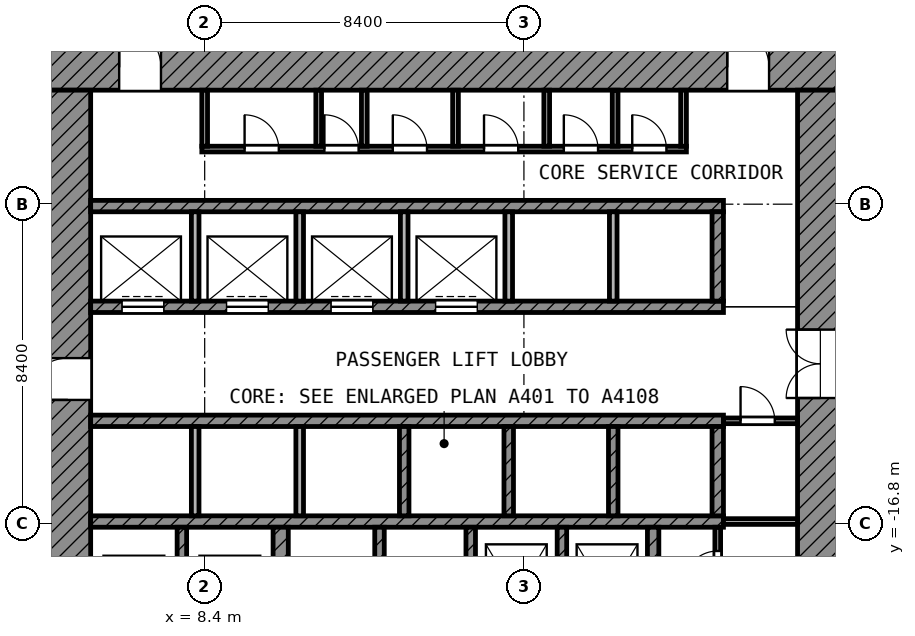
"""IFC4 building model, lengths in metres.
Left out: names, types, materials, properties, quantities, classifications, styles, units other than length and angle.
Written with IfcOpenShell. Run it as: python <this file> out.ifc"""

import sys

from ifc_helpers import new_model, si_unit, direction, frame, frame_2d, origin, place, context, subcontext, project, spatial, rectangle, extrude, element, fill, save


model = new_model("IFC4")
c1 = context("Model", 3, precision=1e-05, world=origin(), true_north=direction((0.0, 1.0)))
c2 = subcontext(c1, "Body", "Model", "MODEL_VIEW")
j1 = project(units=[si_unit("LENGTHUNIT", "METRE"), si_unit("PLANEANGLEUNIT", "RADIAN")], contexts=[c1])
p1 = place(None, origin())
s1 = spatial("IfcSite", under=j1, at=p1, CompositionType="ELEMENT")
p2 = place(p1, origin())
s2 = spatial("IfcBuilding", under=s1, at=p2, CompositionType="ELEMENT")
p3 = place(p2, frame((0.0, 0.0, 23.8)))
s3 = spatial("IfcBuildingStorey", under=s2, at=p3, CompositionType="ELEMENT", Elevation=23.8)
p4 = place(p3, frame((4.2, -4.8, 0.0), z_axis=(0.0, 0.0, 1.0), x_axis=(1.0, 0.0, 0.0)))
e1 = element("IfcWall", 1, at=p4, inside=s3, PredefinedType="SHEAR", context=c2, shape_type="SweptSolid", body=[
    extrude(rectangle(XDim=21.0, YDim=1.2, at=frame_2d((10.5, 0.0))), origin(), (0.0, 0.0, 1.0), 4.85),
])
p5 = place(p4, frame((1.95, 0.0, 0.0)))
e2 = element("IfcOpeningElement", 2, at=p5, cuts=e1, PredefinedType="OPENING", context=c2, shape_type="SweptSolid", body=[
    extrude(rectangle(XDim=1.1, YDim=2.1, at=frame_2d((0.55, 1.05))), frame((0.0, 0.61, 0.0), z_axis=(0.0, -1.0, 0.0), x_axis=(1.0, 0.0, 0.0)), (0.0, 0.0, 1.0), 1.22),
])
p6 = place(p4, frame((17.95, 0.0, 0.0)))
e3 = element("IfcOpeningElement", 3, at=p6, cuts=e1, PredefinedType="OPENING", context=c2, shape_type="SweptSolid", body=[
    extrude(rectangle(XDim=1.1, YDim=2.1, at=frame_2d((0.55, 1.05))), frame((0.0, 0.61, 0.0), z_axis=(0.0, -1.0, 0.0), x_axis=(1.0, 0.0, 0.0)), (0.0, 0.0, 1.0), 1.22),
])
p7 = place(p3, frame((4.8, -25.2, 0.0), z_axis=(0.0, 0.0, 1.0), x_axis=(0.0, 1.0, 0.0)))
e4 = element("IfcWall", 4, at=p7, inside=s3, PredefinedType="SHEAR", context=c2, shape_type="SweptSolid", body=[
    extrude(rectangle(XDim=19.8, YDim=1.2, at=frame_2d((9.9, 0.0))), origin(), (0.0, 0.0, 1.0), 4.85),
])
p8 = place(p7, frame((11.65, 0.0, 0.0)))
e5 = element("IfcOpeningElement", 5, at=p8, cuts=e4, PredefinedType="OPENING", context=c2, shape_type="SweptSolid", body=[
    extrude(rectangle(XDim=1.1, YDim=2.1, at=frame_2d((0.55, 1.05))), frame((0.0, 0.61, 0.0), z_axis=(0.0, -1.0, 0.0), x_axis=(1.0, 0.0, 0.0)), (0.0, 0.0, 1.0), 1.22),
])
p9 = place(p7, frame((2.35, 0.0, 0.0)))
e6 = element("IfcOpeningElement", 6, at=p9, cuts=e4, PredefinedType="OPENING", context=c2, shape_type="SweptSolid", body=[
    extrude(rectangle(XDim=1.1, YDim=2.1, at=frame_2d((0.55, 1.05))), frame((0.0, 0.61, 0.0), z_axis=(0.0, -1.0, 0.0), x_axis=(1.0, 0.0, 0.0)), (0.0, 0.0, 1.0), 1.22),
])
p10 = place(p3, frame((24.6, -24.0, 0.0), z_axis=(0.0, 0.0, 1.0), x_axis=(0.0, 1.0, 0.0)))
e7 = element("IfcWall", 7, at=p10, inside=s3, PredefinedType="SHEAR", context=c2, shape_type="SweptSolid", body=[
    extrude(rectangle(XDim=18.6, YDim=1.2, at=frame_2d((9.3, 0.0))), origin(), (0.0, 0.0, 1.0), 4.85),
])
p11 = place(p10, frame((10.5, 0.0, 0.0)))
e8 = element("IfcOpeningElement", 8, at=p11, cuts=e7, PredefinedType="OPENING", context=c2, shape_type="SweptSolid", body=[
    extrude(rectangle(XDim=1.8, YDim=2.1, at=frame_2d((0.9, 1.05))), frame((0.0, 0.61, 0.0), z_axis=(0.0, -1.0, 0.0), x_axis=(1.0, 0.0, 0.0)), (0.0, 0.0, 1.0), 1.22),
])
p12 = place(p3, frame((5.4, -8.45, 0.0), z_axis=(0.0, 0.0, 1.0), x_axis=(1.0, 0.0, 0.0)))
e9 = element("IfcWall", 9, at=p12, inside=s3, PredefinedType="SHEAR", context=c2, shape_type="SweptSolid", body=[
    extrude(rectangle(XDim=16.65, YDim=0.3, at=frame_2d((8.325, 0.0))), origin(), (0.0, 0.0, 1.0), 4.85),
])
p13 = place(p3, frame((5.4, -11.1, 0.0), z_axis=(0.0, 0.0, 1.0), x_axis=(1.0, 0.0, 0.0)))
e10 = element("IfcWall", 10, at=p13, inside=s3, PredefinedType="SHEAR", context=c2, shape_type="SweptSolid", body=[
    extrude(rectangle(XDim=16.65, YDim=0.3, at=frame_2d((8.325, 0.0))), origin(), (0.0, 0.0, 1.0), 4.85),
])
p14 = place(p13, frame((0.825, 0.0, 0.0)))
e11 = element("IfcOpeningElement", 11, at=p14, cuts=e10, PredefinedType="OPENING", context=c2, shape_type="SweptSolid", body=[
    extrude(rectangle(XDim=1.1, YDim=2.1, at=frame_2d((0.55, 1.05))), frame((0.0, 0.16, 0.0), z_axis=(0.0, -1.0, 0.0), x_axis=(1.0, 0.0, 0.0)), (0.0, 0.0, 1.0), 0.32),
])
p15 = place(p13, frame((3.575, 0.0, 0.0)))
e12 = element("IfcOpeningElement", 12, at=p15, cuts=e10, PredefinedType="OPENING", context=c2, shape_type="SweptSolid", body=[
    extrude(rectangle(XDim=1.1, YDim=2.1, at=frame_2d((0.55, 1.05))), frame((0.0, 0.16, 0.0), z_axis=(0.0, -1.0, 0.0), x_axis=(1.0, 0.0, 0.0)), (0.0, 0.0, 1.0), 0.32),
])
p16 = place(p13, frame((6.325, 0.0, 0.0)))
e13 = element("IfcOpeningElement", 13, at=p16, cuts=e10, PredefinedType="OPENING", context=c2, shape_type="SweptSolid", body=[
    extrude(rectangle(XDim=1.1, YDim=2.1, at=frame_2d((0.55, 1.05))), frame((0.0, 0.16, 0.0), z_axis=(0.0, -1.0, 0.0), x_axis=(1.0, 0.0, 0.0)), (0.0, 0.0, 1.0), 0.32),
])
p17 = place(p13, frame((9.075, 0.0, 0.0)))
e14 = element("IfcOpeningElement", 14, at=p17, cuts=e10, PredefinedType="OPENING", context=c2, shape_type="SweptSolid", body=[
    extrude(rectangle(XDim=1.1, YDim=2.1, at=frame_2d((0.55, 1.05))), frame((0.0, 0.16, 0.0), z_axis=(0.0, -1.0, 0.0), x_axis=(1.0, 0.0, 0.0)), (0.0, 0.0, 1.0), 0.32),
])
for number, where, z_axis, x_axis in (
    (15, (5.4, -14.1, 0.0), (0.0, 0.0, 1.0), (1.0, 0.0, 0.0)),
    (16, (5.4, -16.75, 0.0), (0.0, 0.0, 1.0), (1.0, 0.0, 0.0)),
):
    element("IfcWall", number, at=place(p3, frame(where, z_axis=z_axis, x_axis=x_axis)), inside=s3, PredefinedType="SHEAR", context=c2, shape_type="SweptSolid", body=[
        extrude(rectangle(XDim=16.65, YDim=0.3, at=frame_2d((8.325, 0.0))), origin(), (0.0, 0.0, 1.0), 4.85),
    ])
p18 = place(p3, frame((10.4, -20.05, 0.0), z_axis=(0.0, 0.0, 1.0), x_axis=(0.0, 1.0, 0.0)))
e17 = element("IfcWall", 17, at=p18, inside=s3, PredefinedType="SHEAR", context=c2, shape_type="SweptSolid", body=[
    extrude(rectangle(XDim=3.15, YDim=0.4, at=frame_2d((1.575, 0.0))), origin(), (0.0, 0.0, 1.0), 4.85),
])
p19 = place(p3, frame((20.2, -20.35, 0.0), z_axis=(0.0, 0.0, 1.0), x_axis=(0.0, 1.0, 0.0)))
e18 = element("IfcWall", 18, at=p19, inside=s3, PredefinedType="SHEAR", context=c2, shape_type="SweptSolid", body=[
    extrude(rectangle(XDim=3.45, YDim=0.3, at=frame_2d((1.725, 0.0))), origin(), (0.0, 0.0, 1.0), 4.85),
])
p20 = place(p3, frame((21.9, -10.95, 0.0), z_axis=(0.0, 0.0, 1.0), x_axis=(0.0, 1.0, 0.0)))
e19 = element("IfcWall", 19, at=p20, inside=s3, PredefinedType="SHEAR", context=c2, shape_type="SweptSolid", body=[
    extrude(rectangle(XDim=2.35, YDim=0.3, at=frame_2d((1.175, 0.0))), origin(), (0.0, 0.0, 1.0), 4.85),
])
p21 = place(p3, frame((21.9, -16.6, 0.0), z_axis=(0.0, 0.0, 1.0), x_axis=(0.0, 1.0, 0.0)))
e20 = element("IfcWall", 20, at=p21, inside=s3, PredefinedType="SHEAR", context=c2, shape_type="SweptSolid", body=[
    extrude(rectangle(XDim=2.35, YDim=0.3, at=frame_2d((1.175, 0.0))), origin(), (0.0, 0.0, 1.0), 4.85),
])
for number, where, z_axis, x_axis in (
    (21, (7.8, -20.05, 0.0), (0.0, 0.0, 1.0), (0.0, 1.0, 0.0)),
    (22, (13.0, -20.05, 0.0), (0.0, 0.0, 1.0), (0.0, 1.0, 0.0)),
    (23, (15.4, -20.05, 0.0), (0.0, 0.0, 1.0), (0.0, 1.0, 0.0)),
    (24, (17.8, -20.05, 0.0), (0.0, 0.0, 1.0), (0.0, 1.0, 0.0)),
):
    element("IfcWall", number, at=place(p3, frame(where, z_axis=z_axis, x_axis=x_axis)), inside=s3, PredefinedType="SHEAR", context=c2, shape_type="SweptSolid", body=[
        extrude(rectangle(XDim=3.15, YDim=0.25, at=frame_2d((1.575, 0.0))), origin(), (0.0, 0.0, 1.0), 4.85),
    ])
for number, where, z_axis, x_axis in (
    (25, (8.15, -10.95, 0.0), (0.0, 0.0, 1.0), (0.0, 1.0, 0.0)),
    (26, (10.9, -10.95, 0.0), (0.0, 0.0, 1.0), (0.0, 1.0, 0.0)),
    (27, (13.65, -10.95, 0.0), (0.0, 0.0, 1.0), (0.0, 1.0, 0.0)),
    (28, (16.4, -10.95, 0.0), (0.0, 0.0, 1.0), (0.0, 1.0, 0.0)),
    (29, (19.15, -10.95, 0.0), (0.0, 0.0, 1.0), (0.0, 1.0, 0.0)),
):
    element("IfcWall", number, at=place(p3, frame(where, z_axis=z_axis, x_axis=x_axis)), inside=s3, PredefinedType="PARTITIONING", context=c2, shape_type="SweptSolid", body=[
        extrude(rectangle(XDim=2.35, YDim=0.2, at=frame_2d((1.175, 0.0))), origin(), (0.0, 0.0, 1.0), 4.85),
    ])
for number, where, z_axis, x_axis in (
    (30, (8.15, -16.6, 0.0), (0.0, 0.0, 1.0), (0.0, 1.0, 0.0)),
    (31, (10.9, -16.6, 0.0), (0.0, 0.0, 1.0), (0.0, 1.0, 0.0)),
):
    element("IfcWall", number, at=place(p3, frame(where, z_axis=z_axis, x_axis=x_axis)), inside=s3, PredefinedType="PARTITIONING", context=c2, shape_type="SweptSolid", body=[
        extrude(rectangle(XDim=2.35, YDim=0.2, at=frame_2d((1.175, 0.0))), origin(), (0.0, 0.0, 1.0), 4.85),
    ])
for number, where, z_axis, x_axis in (
    (32, (13.65, -16.6, 0.0), (0.0, 0.0, 1.0), (0.0, 1.0, 0.0)),
    (33, (16.4, -16.6, 0.0), (0.0, 0.0, 1.0), (0.0, 1.0, 0.0)),
    (34, (19.15, -16.6, 0.0), (0.0, 0.0, 1.0), (0.0, 1.0, 0.0)),
):
    element("IfcWall", number, at=place(p3, frame(where, z_axis=z_axis, x_axis=x_axis)), inside=s3, PredefinedType="SHEAR", context=c2, shape_type="SweptSolid", body=[
        extrude(rectangle(XDim=2.35, YDim=0.25, at=frame_2d((1.175, 0.0))), origin(), (0.0, 0.0, 1.0), 4.85),
    ])
p22 = place(p3, frame((21.9, -19.05, 0.0), z_axis=(0.0, 0.0, 1.0), x_axis=(0.0, 1.0, 0.0)))
e35 = element("IfcWall", 35, at=p22, inside=s3, PredefinedType="PARTITIONING", context=c2, shape_type="SweptSolid", body=[
    extrude(rectangle(XDim=2.15, YDim=0.15, at=frame_2d((1.075, 0.0))), origin(), (0.0, 0.0, 1.0), 4.85),
])
p23 = place(p22, frame((0.625, 0.0, 0.0)))
e36 = element("IfcOpeningElement", 36, at=p23, cuts=e35, PredefinedType="OPENING", context=c2, shape_type="SweptSolid", body=[
    extrude(rectangle(XDim=0.9, YDim=2.1, at=frame_2d((0.45, 1.05))), frame((0.0, 0.085, 0.0), z_axis=(0.0, -1.0, 0.0), x_axis=(1.0, 0.0, 0.0)), (0.0, 0.0, 1.0), 0.17),
])
p24 = place(p3, frame((22.05, -16.75, 0.0), z_axis=(0.0, 0.0, 1.0), x_axis=(1.0, 0.0, 0.0)))
e37 = element("IfcWall", 37, at=p24, inside=s3, PredefinedType="PARTITIONING", context=c2, shape_type="SweptSolid", body=[
    extrude(rectangle(XDim=1.95, YDim=0.15, at=frame_2d((0.975, 0.0))), origin(), (0.0, 0.0, 1.0), 4.85),
])
p25 = place(p3, frame((22.05, -14.1, 0.0), z_axis=(0.0, 0.0, 1.0), x_axis=(1.0, 0.0, 0.0)))
e38 = element("IfcWall", 38, at=p25, inside=s3, PredefinedType="PARTITIONING", context=c2, shape_type="SweptSolid", body=[
    extrude(rectangle(XDim=1.95, YDim=0.15, at=frame_2d((0.975, 0.0))), origin(), (0.0, 0.0, 1.0), 4.85),
])
p26 = place(p25, frame((0.45, 0.0, 0.0)))
e39 = element("IfcOpeningElement", 39, at=p26, cuts=e38, PredefinedType="OPENING", context=c2, shape_type="SweptSolid", body=[
    extrude(rectangle(XDim=0.9, YDim=2.1, at=frame_2d((0.45, 1.05))), frame((0.0, 0.085, 0.0), z_axis=(0.0, -1.0, 0.0), x_axis=(1.0, 0.0, 0.0)), (0.0, 0.0, 1.0), 0.17),
])
p27 = place(p3, frame((8.325, -6.95, 0.0), z_axis=(0.0, 0.0, 1.0), x_axis=(1.0, 0.0, 0.0)))
e40 = element("IfcWall", 40, at=p27, inside=s3, PredefinedType="PARTITIONING", context=c2, shape_type="SweptSolid", body=[
    extrude(rectangle(XDim=12.75, YDim=0.15, at=frame_2d((6.375, 0.0))), origin(), (0.0, 0.0, 1.0), 4.85),
])
p28 = place(p27, frame((1.125, 0.0, 0.0)))
e41 = element("IfcOpeningElement", 41, at=p28, cuts=e40, PredefinedType="OPENING", context=c2, shape_type="SweptSolid", body=[
    extrude(rectangle(XDim=0.9, YDim=2.1, at=frame_2d((0.45, 1.05))), frame((0.0, 0.085, 0.0), z_axis=(0.0, -1.0, 0.0), x_axis=(1.0, 0.0, 0.0)), (0.0, 0.0, 1.0), 0.17),
])
p29 = place(p27, frame((3.225, 0.0, 0.0)))
e42 = element("IfcOpeningElement", 42, at=p29, cuts=e40, PredefinedType="OPENING", context=c2, shape_type="SweptSolid", body=[
    extrude(rectangle(XDim=0.9, YDim=2.1, at=frame_2d((0.45, 1.05))), frame((0.0, 0.085, 0.0), z_axis=(0.0, -1.0, 0.0), x_axis=(1.0, 0.0, 0.0)), (0.0, 0.0, 1.0), 0.17),
])
p30 = place(p27, frame((5.025, 0.0, 0.0)))
e43 = element("IfcOpeningElement", 43, at=p30, cuts=e40, PredefinedType="OPENING", context=c2, shape_type="SweptSolid", body=[
    extrude(rectangle(XDim=0.9, YDim=2.1, at=frame_2d((0.45, 1.05))), frame((0.0, 0.085, 0.0), z_axis=(0.0, -1.0, 0.0), x_axis=(1.0, 0.0, 0.0)), (0.0, 0.0, 1.0), 0.17),
])
p31 = place(p27, frame((7.425, 0.0, 0.0)))
e44 = element("IfcOpeningElement", 44, at=p31, cuts=e40, PredefinedType="OPENING", context=c2, shape_type="SweptSolid", body=[
    extrude(rectangle(XDim=0.9, YDim=2.1, at=frame_2d((0.45, 1.05))), frame((0.0, 0.085, 0.0), z_axis=(0.0, -1.0, 0.0), x_axis=(1.0, 0.0, 0.0)), (0.0, 0.0, 1.0), 0.17),
])
p32 = place(p27, frame((9.525, 0.0, 0.0)))
e45 = element("IfcOpeningElement", 45, at=p32, cuts=e40, PredefinedType="OPENING", context=c2, shape_type="SweptSolid", body=[
    extrude(rectangle(XDim=0.9, YDim=2.1, at=frame_2d((0.45, 1.05))), frame((0.0, 0.085, 0.0), z_axis=(0.0, -1.0, 0.0), x_axis=(1.0, 0.0, 0.0)), (0.0, 0.0, 1.0), 0.17),
])
p33 = place(p27, frame((11.325, 0.0, 0.0)))
e46 = element("IfcOpeningElement", 46, at=p33, cuts=e40, PredefinedType="OPENING", context=c2, shape_type="SweptSolid", body=[
    extrude(rectangle(XDim=0.9, YDim=2.1, at=frame_2d((0.45, 1.05))), frame((0.0, 0.085, 0.0), z_axis=(0.0, -1.0, 0.0), x_axis=(1.0, 0.0, 0.0)), (0.0, 0.0, 1.0), 0.17),
])
for number, where, z_axis, x_axis in (
    (47, (8.4, -6.875, 0.0), (0.0, 0.0, 1.0), (0.0, 1.0, 0.0)),
    (48, (11.4, -6.875, 0.0), (0.0, 0.0, 1.0), (0.0, 1.0, 0.0)),
    (49, (12.6, -6.875, 0.0), (0.0, 0.0, 1.0), (0.0, 1.0, 0.0)),
    (50, (15.0, -6.875, 0.0), (0.0, 0.0, 1.0), (0.0, 1.0, 0.0)),
    (51, (17.4, -6.875, 0.0), (0.0, 0.0, 1.0), (0.0, 1.0, 0.0)),
    (52, (19.2, -6.875, 0.0), (0.0, 0.0, 1.0), (0.0, 1.0, 0.0)),
    (53, (21.0, -6.875, 0.0), (0.0, 0.0, 1.0), (0.0, 1.0, 0.0)),
):
    element("IfcWall", number, at=place(p3, frame(where, z_axis=z_axis, x_axis=x_axis)), inside=s3, PredefinedType="PARTITIONING", context=c2, shape_type="SweptSolid", body=[
        extrude(rectangle(XDim=1.475, YDim=0.15, at=frame_2d((0.738, 0.0))), origin(), (0.0, 0.0, 1.0), 4.85),
    ])
p34 = place(p14, origin())
e54 = element("IfcDoor", 54, at=p34, inside=s3, OperationType="DOUBLE_DOOR_SLIDING", PredefinedType="DOOR", context=c2, shape_type="SweptSolid", body=[
    extrude(rectangle(XDim=1.1, YDim=2.1, at=frame_2d((0.55, 1.05))), frame((0.0, 0.025, 0.0), z_axis=(0.0, -1.0, 0.0), x_axis=(1.0, 0.0, 0.0)), (0.0, 0.0, 1.0), 0.05),
])
fill(e11, e54)
p35 = place(p15, origin())
e55 = element("IfcDoor", 55, at=p35, inside=s3, OperationType="DOUBLE_DOOR_SLIDING", PredefinedType="DOOR", context=c2, shape_type="SweptSolid", body=[
    extrude(rectangle(XDim=1.1, YDim=2.1, at=frame_2d((0.55, 1.05))), frame((0.0, 0.025, 0.0), z_axis=(0.0, -1.0, 0.0), x_axis=(1.0, 0.0, 0.0)), (0.0, 0.0, 1.0), 0.05),
])
fill(e12, e55)
p36 = place(p16, origin())
e56 = element("IfcDoor", 56, at=p36, inside=s3, OperationType="DOUBLE_DOOR_SLIDING", PredefinedType="DOOR", context=c2, shape_type="SweptSolid", body=[
    extrude(rectangle(XDim=1.1, YDim=2.1, at=frame_2d((0.55, 1.05))), frame((0.0, 0.025, 0.0), z_axis=(0.0, -1.0, 0.0), x_axis=(1.0, 0.0, 0.0)), (0.0, 0.0, 1.0), 0.05),
])
fill(e13, e56)
p37 = place(p17, origin())
e57 = element("IfcDoor", 57, at=p37, inside=s3, OperationType="DOUBLE_DOOR_SLIDING", PredefinedType="DOOR", context=c2, shape_type="SweptSolid", body=[
    extrude(rectangle(XDim=1.1, YDim=2.1, at=frame_2d((0.55, 1.05))), frame((0.0, 0.025, 0.0), z_axis=(0.0, -1.0, 0.0), x_axis=(1.0, 0.0, 0.0)), (0.0, 0.0, 1.0), 0.05),
])
fill(e14, e57)
p38 = place(p8, origin())
e58 = element("IfcDoor", 58, at=p38, inside=s3, OperationType="SINGLE_SWING_LEFT", PredefinedType="DOOR", context=c2, shape_type="SweptSolid", body=[
    extrude(rectangle(XDim=1.1, YDim=2.1, at=frame_2d((0.55, 1.05))), frame((0.0, 0.025, 0.0), z_axis=(0.0, -1.0, 0.0), x_axis=(1.0, 0.0, 0.0)), (0.0, 0.0, 1.0), 0.05),
])
fill(e5, e58)
p39 = place(p5, origin())
e59 = element("IfcDoor", 59, at=p39, inside=s3, OperationType="SINGLE_SWING_LEFT", PredefinedType="DOOR", context=c2, shape_type="SweptSolid", body=[
    extrude(rectangle(XDim=1.1, YDim=2.1, at=frame_2d((0.55, 1.05))), frame((0.0, 0.025, 0.0), z_axis=(0.0, -1.0, 0.0), x_axis=(1.0, 0.0, 0.0)), (0.0, 0.0, 1.0), 0.05),
])
fill(e2, e59)
p40 = place(p6, origin())
e60 = element("IfcDoor", 60, at=p40, inside=s3, OperationType="SINGLE_SWING_LEFT", PredefinedType="DOOR", context=c2, shape_type="SweptSolid", body=[
    extrude(rectangle(XDim=1.1, YDim=2.1, at=frame_2d((0.55, 1.05))), frame((0.0, 0.025, 0.0), z_axis=(0.0, -1.0, 0.0), x_axis=(1.0, 0.0, 0.0)), (0.0, 0.0, 1.0), 0.05),
])
fill(e3, e60)
p41 = place(p11, origin())
e61 = element("IfcDoor", 61, at=p41, inside=s3, OperationType="DOUBLE_DOOR_SINGLE_SWING", PredefinedType="DOOR", context=c2, shape_type="SweptSolid", body=[
    extrude(rectangle(XDim=1.8, YDim=2.1, at=frame_2d((0.9, 1.05))), frame((0.0, 0.025, 0.0), z_axis=(0.0, -1.0, 0.0), x_axis=(1.0, 0.0, 0.0)), (0.0, 0.0, 1.0), 0.05),
])
fill(e8, e61)
p42 = place(p28, origin())
e62 = element("IfcDoor", 62, at=p42, inside=s3, OperationType="SINGLE_SWING_LEFT", PredefinedType="DOOR", context=c2, shape_type="SweptSolid", body=[
    extrude(rectangle(XDim=0.9, YDim=2.1, at=frame_2d((0.45, 1.05))), frame((0.0, 0.025, 0.0), z_axis=(0.0, -1.0, 0.0), x_axis=(1.0, 0.0, 0.0)), (0.0, 0.0, 1.0), 0.05),
])
fill(e41, e62)
p43 = place(p29, origin())
e63 = element("IfcDoor", 63, at=p43, inside=s3, OperationType="SINGLE_SWING_LEFT", PredefinedType="DOOR", context=c2, shape_type="SweptSolid", body=[
    extrude(rectangle(XDim=0.9, YDim=2.1, at=frame_2d((0.45, 1.05))), frame((0.0, 0.025, 0.0), z_axis=(0.0, -1.0, 0.0), x_axis=(1.0, 0.0, 0.0)), (0.0, 0.0, 1.0), 0.05),
])
fill(e42, e63)
p44 = place(p30, origin())
e64 = element("IfcDoor", 64, at=p44, inside=s3, OperationType="SINGLE_SWING_LEFT", PredefinedType="DOOR", context=c2, shape_type="SweptSolid", body=[
    extrude(rectangle(XDim=0.9, YDim=2.1, at=frame_2d((0.45, 1.05))), frame((0.0, 0.025, 0.0), z_axis=(0.0, -1.0, 0.0), x_axis=(1.0, 0.0, 0.0)), (0.0, 0.0, 1.0), 0.05),
])
fill(e43, e64)
p45 = place(p31, origin())
e65 = element("IfcDoor", 65, at=p45, inside=s3, OperationType="SINGLE_SWING_LEFT", PredefinedType="DOOR", context=c2, shape_type="SweptSolid", body=[
    extrude(rectangle(XDim=0.9, YDim=2.1, at=frame_2d((0.45, 1.05))), frame((0.0, 0.025, 0.0), z_axis=(0.0, -1.0, 0.0), x_axis=(1.0, 0.0, 0.0)), (0.0, 0.0, 1.0), 0.05),
])
fill(e44, e65)
p46 = place(p32, origin())
e66 = element("IfcDoor", 66, at=p46, inside=s3, OperationType="SINGLE_SWING_LEFT", PredefinedType="DOOR", context=c2, shape_type="SweptSolid", body=[
    extrude(rectangle(XDim=0.9, YDim=2.1, at=frame_2d((0.45, 1.05))), frame((0.0, 0.025, 0.0), z_axis=(0.0, -1.0, 0.0), x_axis=(1.0, 0.0, 0.0)), (0.0, 0.0, 1.0), 0.05),
])
fill(e45, e66)
p47 = place(p33, origin())
e67 = element("IfcDoor", 67, at=p47, inside=s3, OperationType="SINGLE_SWING_LEFT", PredefinedType="DOOR", context=c2, shape_type="SweptSolid", body=[
    extrude(rectangle(XDim=0.9, YDim=2.1, at=frame_2d((0.45, 1.05))), frame((0.0, 0.025, 0.0), z_axis=(0.0, -1.0, 0.0), x_axis=(1.0, 0.0, 0.0)), (0.0, 0.0, 1.0), 0.05),
])
fill(e46, e67)
p48 = place(p26, origin())
e68 = element("IfcDoor", 68, at=p48, inside=s3, OperationType="SINGLE_SWING_LEFT", PredefinedType="DOOR", context=c2, shape_type="SweptSolid", body=[
    extrude(rectangle(XDim=0.9, YDim=2.1, at=frame_2d((0.45, 1.05))), frame((0.0, 0.025, 0.0), z_axis=(0.0, -1.0, 0.0), x_axis=(1.0, 0.0, 0.0)), (0.0, 0.0, 1.0), 0.05),
])
fill(e39, e68)
p49 = place(p23, origin())
e69 = element("IfcDoor", 69, at=p49, inside=s3, OperationType="SINGLE_SWING_LEFT", PredefinedType="DOOR", context=c2, shape_type="SweptSolid", body=[
    extrude(rectangle(XDim=0.9, YDim=2.1, at=frame_2d((0.45, 1.05))), frame((0.0, 0.025, 0.0), z_axis=(0.0, -1.0, 0.0), x_axis=(1.0, 0.0, 0.0)), (0.0, 0.0, 1.0), 0.05),
])
fill(e36, e69)
save(model, sys.argv[1])
